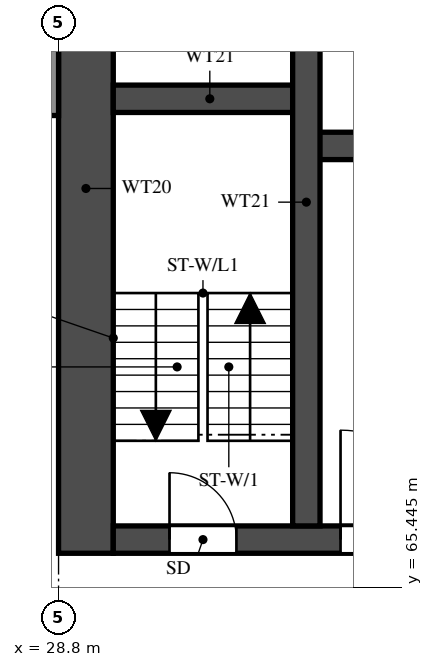
"""IFC4 building model, lengths in metres.
Left out: names, types, materials, properties, quantities, classifications, styles, units other than length and angle.
Written with IfcOpenShell. Run it as: python <this file> out.ifc"""

import sys

from ifc_helpers import new_model, si_unit, direction, frame, frame_2d, origin, place, context, subcontext, project, spatial, rectangle, extrude, element, fill, save


model = new_model("IFC4")
c1 = context("Model", 3, precision=1e-05, world=origin(), true_north=direction((0.0, 1.0)))
c2 = subcontext(c1, "Body", "Model", "MODEL_VIEW")
j1 = project(units=[si_unit("LENGTHUNIT", "METRE"), si_unit("PLANEANGLEUNIT", "RADIAN")], contexts=[c1])
p1 = place(None, origin())
s1 = spatial("IfcSite", under=j1, at=p1, CompositionType="ELEMENT")
p2 = place(p1, origin())
s2 = spatial("IfcBuilding", under=s1, at=p2, CompositionType="ELEMENT")
p3 = place(p2, frame((0.0, 0.0, 79.5)))
s3 = spatial("IfcBuildingStorey", under=s2, at=p3, CompositionType="ELEMENT", Elevation=79.5)
p4 = place(p3, frame((29.25, 66.0, 0.0), z_axis=(0.0, 0.0, 1.0), x_axis=(0.0, 1.0, 0.0)))
e1 = element("IfcWall", 1, at=p4, inside=s3, PredefinedType="SHEAR", context=c2, shape_type="SweptSolid", body=[
    extrude(rectangle(XDim=12.0, YDim=0.9, at=frame_2d((6.0, 0.0))), origin(), (0.0, 0.0, 1.0), 3.18),
])
p5 = place(p3, frame((29.7, 66.225, 0.0), z_axis=(0.0, 0.0, 1.0), x_axis=(1.0, 0.0, 0.0)))
e2 = element("IfcWall", 2, at=p5, inside=s3, PredefinedType="SHEAR", context=c2, shape_type="SweptSolid", body=[
    extrude(rectangle(XDim=41.4, YDim=0.45, at=frame_2d((20.7, 0.0))), origin(), (0.0, 0.0, 1.0), 3.18),
])
p6 = place(p5, frame((0.925, 0.0, 0.0)))
e3 = element("IfcOpeningElement", 3, at=p6, cuts=e2, PredefinedType="OPENING", context=c2, shape_type="SweptSolid", body=[
    extrude(rectangle(XDim=1.1, YDim=2.1, at=frame_2d((0.55, 1.05))), frame((0.0, 0.235, 0.0), z_axis=(0.0, -1.0, 0.0), x_axis=(1.0, 0.0, 0.0)), (0.0, 0.0, 1.0), 0.47),
])
p7 = place(p5, frame((3.738, 0.0, 0.0)))
e4 = element("IfcOpeningElement", 4, at=p7, cuts=e2, PredefinedType="OPENING", context=c2, shape_type="SweptSolid", body=[
    extrude(rectangle(XDim=1.8, YDim=2.1, at=frame_2d((0.9, 1.05))), frame((0.0, 0.235, 0.0), z_axis=(0.0, -1.0, 0.0), x_axis=(1.0, 0.0, 0.0)), (0.0, 0.0, 1.0), 0.47),
])
p8 = place(p3, frame((32.875, 72.7, 0.0), z_axis=(0.0, 0.0, 1.0), x_axis=(1.0, 0.0, 0.0)))
e5 = element("IfcWall", 5, at=p8, inside=s3, PredefinedType="SHEAR", context=c2, shape_type="SweptSolid", body=[
    extrude(rectangle(XDim=35.05, YDim=0.45, at=frame_2d((17.525, 0.0))), origin(), (0.0, 0.0, 1.0), 3.18),
])
p9 = place(p8, frame((19.8, 0.0, 0.0)))
e6 = element("IfcOpeningElement", 6, at=p9, cuts=e5, PredefinedType="OPENING", context=c2, shape_type="SweptSolid", body=[
    extrude(rectangle(XDim=1.1, YDim=2.1, at=frame_2d((0.55, 1.05))), frame((0.0, 0.235, 0.0), z_axis=(0.0, -1.0, 0.0), x_axis=(1.0, 0.0, 0.0)), (0.0, 0.0, 1.0), 0.47),
])
p10 = place(p8, frame((27.65, 0.0, 0.0)))
e7 = element("IfcOpeningElement", 7, at=p10, cuts=e5, PredefinedType="OPENING", context=c2, shape_type="SweptSolid", body=[
    extrude(rectangle(XDim=1.1, YDim=2.1, at=frame_2d((0.55, 1.05))), frame((0.0, 0.235, 0.0), z_axis=(0.0, -1.0, 0.0), x_axis=(1.0, 0.0, 0.0)), (0.0, 0.0, 1.0), 0.47),
])
p11 = place(p8, frame((30.25, 0.0, 0.0)))
e8 = element("IfcOpeningElement", 8, at=p11, cuts=e5, PredefinedType="OPENING", context=c2, shape_type="SweptSolid", body=[
    extrude(rectangle(XDim=1.1, YDim=2.1, at=frame_2d((0.55, 1.05))), frame((0.0, 0.235, 0.0), z_axis=(0.0, -1.0, 0.0), x_axis=(1.0, 0.0, 0.0)), (0.0, 0.0, 1.0), 0.47),
])
p12 = place(p8, frame((3.75, 0.0, 0.0)))
e9 = element("IfcOpeningElement", 9, at=p12, cuts=e5, PredefinedType="OPENING", context=c2, shape_type="SweptSolid", body=[
    extrude(rectangle(XDim=1.1, YDim=2.1, at=frame_2d((0.55, 1.05))), frame((0.0, 0.235, 0.0), z_axis=(0.0, -1.0, 0.0), x_axis=(1.0, 0.0, 0.0)), (0.0, 0.0, 1.0), 0.47),
])
p13 = place(p8, frame((6.5, 0.0, 0.0)))
e10 = element("IfcOpeningElement", 10, at=p13, cuts=e5, PredefinedType="OPENING", context=c2, shape_type="SweptSolid", body=[
    extrude(rectangle(XDim=1.1, YDim=2.1, at=frame_2d((0.55, 1.05))), frame((0.0, 0.235, 0.0), z_axis=(0.0, -1.0, 0.0), x_axis=(1.0, 0.0, 0.0)), (0.0, 0.0, 1.0), 0.47),
])
p14 = place(p8, frame((9.25, 0.0, 0.0)))
e11 = element("IfcOpeningElement", 11, at=p14, cuts=e5, PredefinedType="OPENING", context=c2, shape_type="SweptSolid", body=[
    extrude(rectangle(XDim=1.1, YDim=2.1, at=frame_2d((0.55, 1.05))), frame((0.0, 0.235, 0.0), z_axis=(0.0, -1.0, 0.0), x_axis=(1.0, 0.0, 0.0)), (0.0, 0.0, 1.0), 0.47),
])
p15 = place(p8, frame((12.0, 0.0, 0.0)))
e12 = element("IfcOpeningElement", 12, at=p15, cuts=e5, PredefinedType="OPENING", context=c2, shape_type="SweptSolid", body=[
    extrude(rectangle(XDim=1.1, YDim=2.1, at=frame_2d((0.55, 1.05))), frame((0.0, 0.235, 0.0), z_axis=(0.0, -1.0, 0.0), x_axis=(1.0, 0.0, 0.0)), (0.0, 0.0, 1.0), 0.47),
])
p16 = place(p8, frame((14.75, 0.0, 0.0)))
e13 = element("IfcOpeningElement", 13, at=p16, cuts=e5, PredefinedType="OPENING", context=c2, shape_type="SweptSolid", body=[
    extrude(rectangle(XDim=1.1, YDim=2.1, at=frame_2d((0.55, 1.05))), frame((0.0, 0.235, 0.0), z_axis=(0.0, -1.0, 0.0), x_axis=(1.0, 0.0, 0.0)), (0.0, 0.0, 1.0), 0.47),
])
p17 = place(p8, frame((17.5, 0.0, 0.0)))
e14 = element("IfcOpeningElement", 14, at=p17, cuts=e5, PredefinedType="OPENING", context=c2, shape_type="SweptSolid", body=[
    extrude(rectangle(XDim=1.1, YDim=2.1, at=frame_2d((0.55, 1.05))), frame((0.0, 0.235, 0.0), z_axis=(0.0, -1.0, 0.0), x_axis=(1.0, 0.0, 0.0)), (0.0, 0.0, 1.0), 0.47),
])
p18 = place(p8, frame((0.913, 0.0, 0.0)))
e15 = element("IfcOpeningElement", 15, at=p18, cuts=e5, PredefinedType="OPENING", context=c2, shape_type="SweptSolid", body=[
    extrude(rectangle(XDim=1.1, YDim=2.1, at=frame_2d((0.55, 1.05))), frame((0.0, 0.235, 0.0), z_axis=(0.0, -1.0, 0.0), x_axis=(1.0, 0.0, 0.0)), (0.0, 0.0, 1.0), 0.47),
])
p19 = place(p3, frame((29.7, 73.475, 0.0), z_axis=(0.0, 0.0, 1.0), x_axis=(1.0, 0.0, 0.0)))
e16 = element("IfcWall", 16, at=p19, inside=s3, PredefinedType="SHEAR", context=c2, shape_type="SweptSolid", body=[
    extrude(rectangle(XDim=3.175, YDim=0.45, at=frame_2d((1.587, 0.0))), origin(), (0.0, 0.0, 1.0), 3.18),
])
p20 = place(p3, frame((32.875, 66.45, 0.0), z_axis=(0.0, 0.0, 1.0), x_axis=(0.0, 1.0, 0.0)))
e17 = element("IfcWall", 17, at=p20, inside=s3, PredefinedType="SHEAR", context=c2, shape_type="SweptSolid", body=[
    extrude(rectangle(XDim=10.65, YDim=0.45, at=frame_2d((5.325, 0.0))), origin(), (0.0, 0.0, 1.0), 3.18),
])
p21 = place(p3, frame((28.7, 73.2, 0.0), z_axis=(0.0, 0.0, 1.0), x_axis=(0.0, 1.0, 0.0)))
e18 = element("IfcWall", 18, at=p21, inside=s3, PredefinedType="SOLIDWALL", context=c2, shape_type="SweptSolid", body=[
    extrude(rectangle(XDim=4.8, YDim=0.2, at=frame_2d((2.4, 0.0))), origin(), (0.0, 0.0, 1.0), 3.18),
])
p22 = place(p6, origin())
e19 = element("IfcDoor", 19, at=p22, inside=s3, OperationType="SINGLE_SWING_LEFT", PredefinedType="DOOR", context=c2, shape_type="SweptSolid", body=[
    extrude(rectangle(XDim=1.1, YDim=2.1, at=frame_2d((0.55, 1.05))), frame((0.0, 0.025, 0.0), z_axis=(0.0, -1.0, 0.0), x_axis=(1.0, 0.0, 0.0)), (0.0, 0.0, 1.0), 0.05),
])
fill(e3, e19)
p23 = place(p7, origin())
e20 = element("IfcDoor", 20, at=p23, inside=s3, OperationType="DOUBLE_DOOR_SINGLE_SWING", PredefinedType="DOOR", context=c2, shape_type="SweptSolid", body=[
    extrude(rectangle(XDim=1.8, YDim=2.1, at=frame_2d((0.9, 1.05))), frame((0.0, 0.025, 0.0), z_axis=(0.0, -1.0, 0.0), x_axis=(1.0, 0.0, 0.0)), (0.0, 0.0, 1.0), 0.05),
])
fill(e4, e20)
save(model, sys.argv[1])
